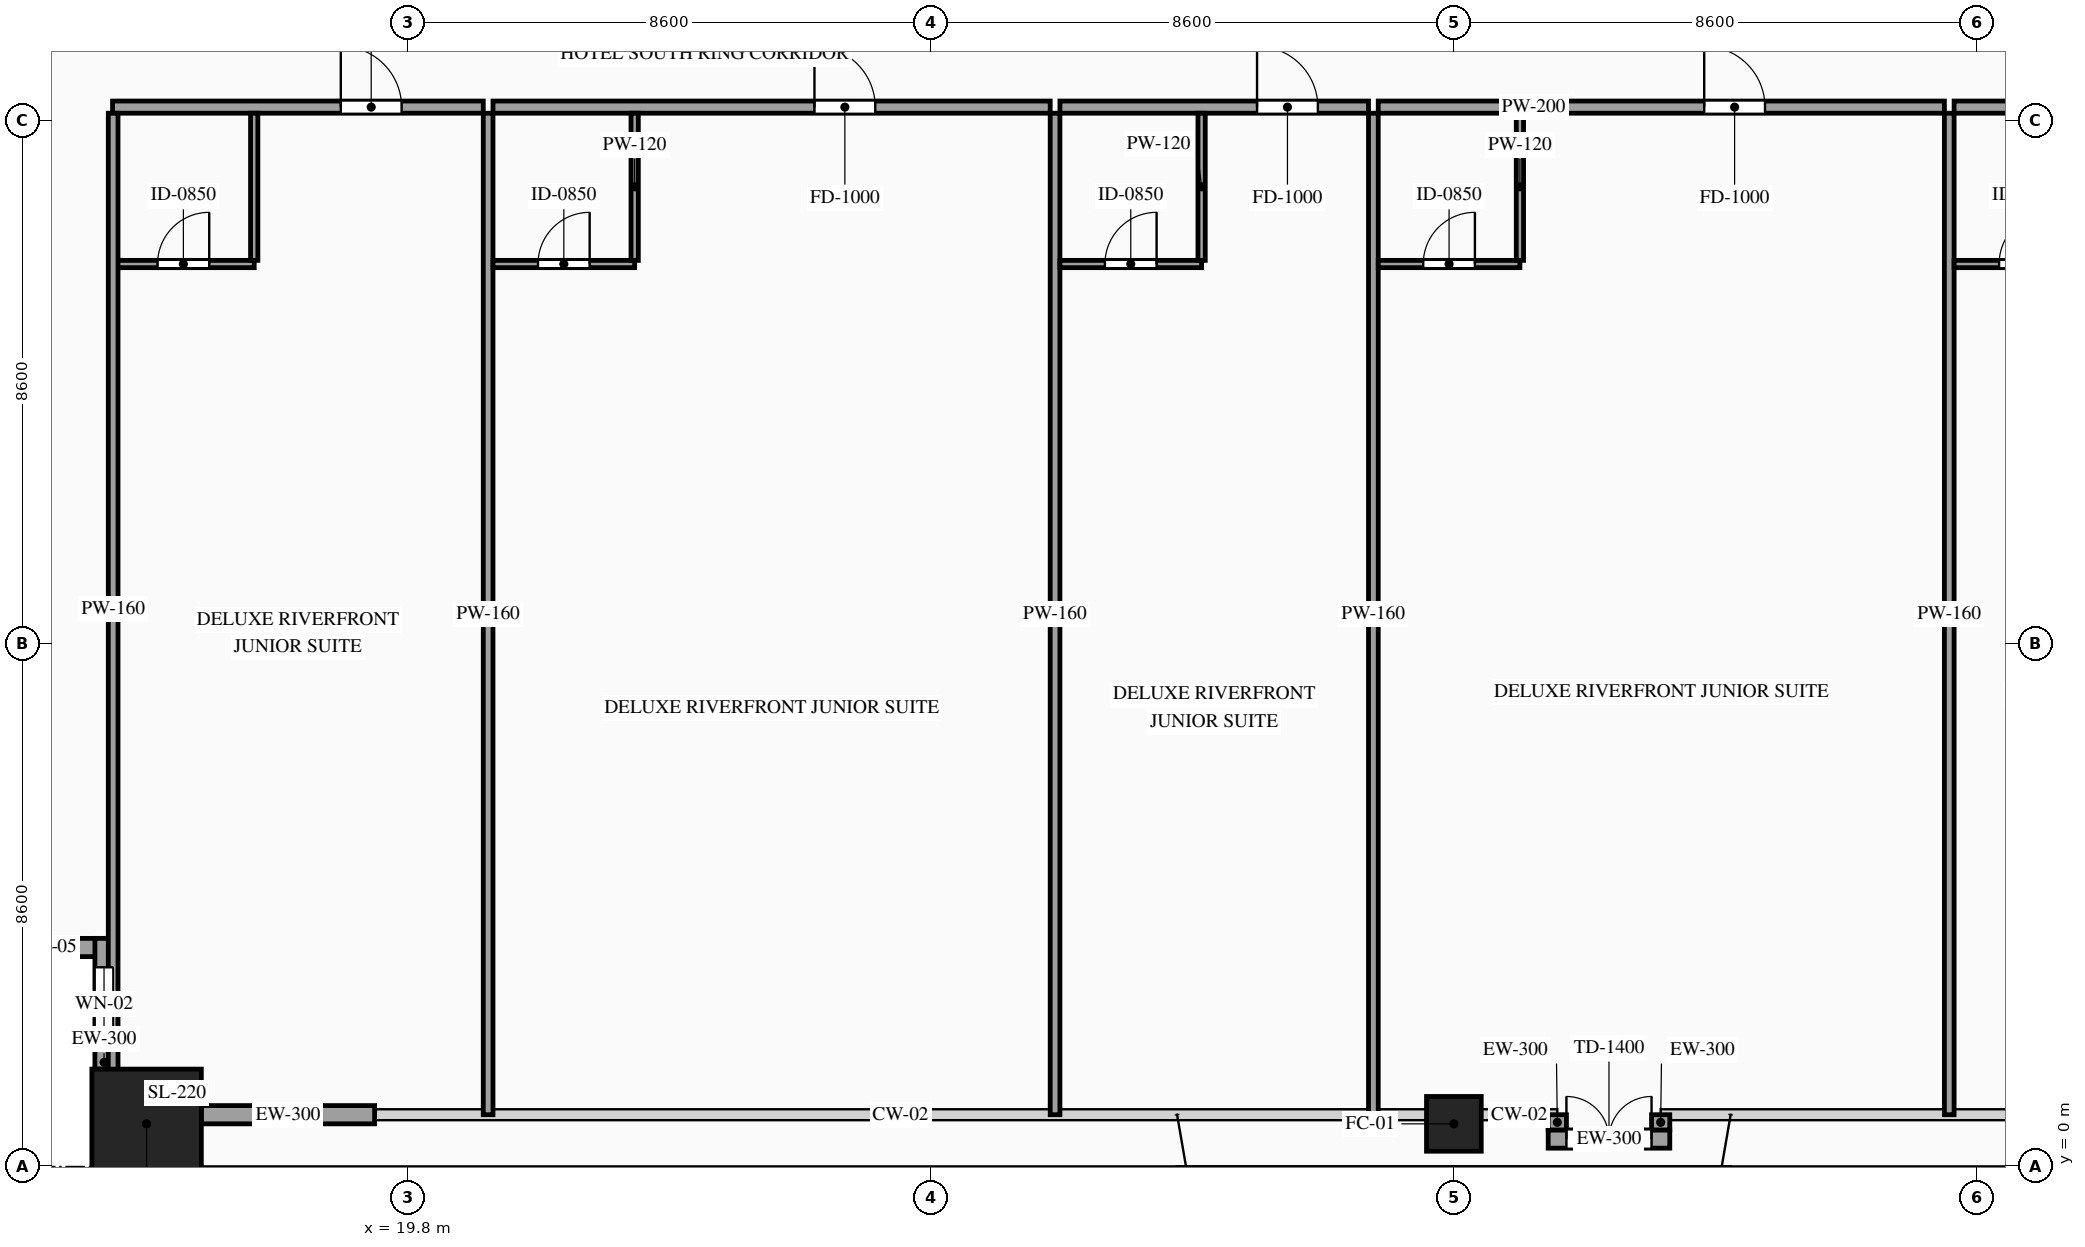
"""IFC4 building model, lengths in metres.
Left out: names, types, materials, properties, quantities, classifications, styles, units other than length and angle.
Written with IfcOpenShell. Run it as: python <this file> out.ifc"""

import sys

from ifc_helpers import new_model, si_unit, direction, frame, frame_2d, origin, origin_2d, place, context, subcontext, project, spatial, rectangle, hollow_rectangle, extrude, source, transform, mapped, element, fill, save


model = new_model("IFC4")
c1 = context("Model", 3, precision=1e-05, world=origin(), true_north=direction((0.0, 1.0)))
c2 = subcontext(c1, "Body", "Model", "MODEL_VIEW")
j1 = project(units=[si_unit("LENGTHUNIT", "METRE"), si_unit("PLANEANGLEUNIT", "RADIAN")], contexts=[c1])
p1 = place(None, origin())
s1 = spatial("IfcSite", under=j1, at=p1, CompositionType="ELEMENT")
p2 = place(p1, origin())
s2 = spatial("IfcBuilding", under=s1, at=p2, CompositionType="ELEMENT")
p3 = place(p2, frame((0.0, 0.0, 56.8)))
s3 = spatial("IfcBuildingStorey", under=s2, at=p3, CompositionType="ELEMENT", Elevation=56.8)
m1 = source(origin(), c2, "Body", "SweptSolid", [
    extrude(hollow_rectangle(XDim=1.8, YDim=1.8, WallThickness=0.08, at=origin_2d()), origin(), (0.0, 0.0, 1.0), 3.6),
])
p4 = place(p3, frame((15.5, 0.7, 0.0), z_axis=(0.0, 0.0, 1.0), x_axis=(1.0, 0.0, 0.0)))
e1 = element("IfcColumn", 1, at=p4, inside=s3, PredefinedType="COLUMN", context=c2, shape_type="MappedRepresentation", body=[
    mapped(m1, transform((0.0, 0.0, 0.0), scale=1.0)),
])
m2 = source(origin(), c2, "Body", "SweptSolid", [
    extrude(hollow_rectangle(XDim=0.9, YDim=0.9, WallThickness=0.042, at=origin_2d()), origin(), (0.0, 0.0, 1.0), 3.6),
])
p5 = place(p3, frame((37.0, 0.7, 0.0), z_axis=(0.0, 0.0, 1.0), x_axis=(1.0, 0.0, 0.0)))
e2 = element("IfcColumn", 2, at=p5, inside=s3, PredefinedType="COLUMN", context=c2, shape_type="MappedRepresentation", body=[
    mapped(m2, transform((0.0, 0.0, 0.0), scale=1.0)),
])
p6 = place(p3, frame((12.8, 3.6, 0.0), z_axis=(0.0, 0.0, 1.0), x_axis=(1.0, 0.0, 0.0)))
e3 = element("IfcWall", 3, at=p6, inside=s3, PredefinedType="SOLIDWALL", context=c2, shape_type="SweptSolid", body=[
    extrude(rectangle(XDim=2.15, YDim=0.3, at=frame_2d((1.075, 0.0))), origin(), (0.0, 0.0, 1.0), 3.38),
])
p7 = place(p6, frame((0.625, 0.0, 0.85)))
e4 = element("IfcOpeningElement", 4, at=p7, cuts=e3, PredefinedType="OPENING", context=c2, shape_type="SweptSolid", body=[
    extrude(rectangle(XDim=0.9, YDim=1.5, at=frame_2d((0.45, 0.75))), frame((0.0, 0.165, 0.0), z_axis=(0.0, -1.0, 0.0), x_axis=(1.0, 0.0, 0.0)), (0.0, 0.0, 1.0), 0.33),
])
p8 = place(p3, frame((14.8, 3.75, 0.0), z_axis=(0.0, 0.0, 1.0), x_axis=(0.0, -1.0, 0.0)))
e5 = element("IfcWall", 5, at=p8, inside=s3, PredefinedType="SOLIDWALL", context=c2, shape_type="SweptSolid", body=[
    extrude(rectangle(XDim=2.15, YDim=0.3, at=frame_2d((1.075, 0.0))), origin(), (0.0, 0.0, 1.0), 3.38),
])
p9 = place(p8, frame((0.475, 0.0, 0.85)))
e6 = element("IfcOpeningElement", 6, at=p9, cuts=e5, PredefinedType="OPENING", context=c2, shape_type="SweptSolid", body=[
    extrude(rectangle(XDim=1.2, YDim=2.1, at=frame_2d((0.6, 1.05))), frame((0.0, 0.165, 0.0), z_axis=(0.0, -1.0, 0.0), x_axis=(1.0, 0.0, 0.0)), (0.0, 0.0, 1.0), 0.33),
])
m3 = source(origin(), c2, "Body", "SweptSolid", [
    extrude(rectangle(XDim=2.85, YDim=0.3, at=frame_2d((1.425, 0.0))), origin(), (0.0, 0.0, 1.0), 2.775),
])
p10 = place(p3, frame((16.4, 0.85, 0.0), z_axis=(0.0, 0.0, 1.0), x_axis=(1.0, 0.0, 0.0)))
e7 = element("IfcWall", 7, at=p10, inside=s3, PredefinedType="SOLIDWALL", context=c2, shape_type="MappedRepresentation", body=[
    mapped(m3, transform((0.0, 0.0, 0.0), scale=1.0)),
])
p11 = place(p3, frame((38.551, 0.45, 0.0), z_axis=(0.0, 0.0, 1.0), x_axis=(1.0, 0.0, 0.0)))
e8 = element("IfcWall", 8, at=p11, inside=s3, PredefinedType="SOLIDWALL", context=c2, shape_type="SweptSolid", body=[
    extrude(rectangle(XDim=2.0, YDim=0.3, at=frame_2d((1.0, 0.0))), origin(), (0.0, 0.0, 1.0), 3.38),
])
p12 = place(p11, frame((0.3, 0.0, 0.0)))
e9 = element("IfcOpeningElement", 9, at=p12, cuts=e8, PredefinedType="OPENING", context=c2, shape_type="SweptSolid", body=[
    extrude(rectangle(XDim=1.4, YDim=2.3, at=frame_2d((0.7, 1.15))), frame((0.0, 0.165, 0.0), z_axis=(0.0, -1.0, 0.0), x_axis=(1.0, 0.0, 0.0)), (0.0, 0.0, 1.0), 0.33),
])
m4 = source(origin(), c2, "Body", "SweptSolid", [
    extrude(rectangle(XDim=0.25, YDim=0.3, at=frame_2d((0.125, 0.0))), origin(), (0.0, 0.0, 1.0), 3.38),
])
for number, where, z_axis, x_axis in (
    (10, (38.701, 0.85, 0.0), (0.0, 0.0, 1.0), (0.0, -1.0, 0.0)),
    (11, (40.401, 0.6, 0.0), (0.0, 0.0, 1.0), (0.0, 1.0, 0.0)),
):
    element("IfcWall", number, at=place(p3, frame(where, z_axis=z_axis, x_axis=x_axis)), inside=s3, PredefinedType="SOLIDWALL", context=c2, shape_type="MappedRepresentation", body=[
        mapped(m4, transform((0.0, 0.0, 0.0), scale=1.0)),
    ])
p13 = place(p3, frame((14.94, 17.42, 0.0), z_axis=(0.0, 0.0, 1.0), x_axis=(1.0, 0.0, 0.0)))
e12 = element("IfcWall", 12, at=p13, inside=s3, PredefinedType="PARTITIONING", context=c2, shape_type="SweptSolid", body=[
    extrude(rectangle(XDim=6.097, YDim=0.2, at=frame_2d((3.049, 0.0))), origin(), (0.0, 0.0, 1.0), 3.38),
])
p14 = place(p13, frame((3.754, 0.0, 0.0)))
e13 = element("IfcOpeningElement", 13, at=p14, cuts=e12, PredefinedType="OPENING", context=c2, shape_type="SweptSolid", body=[
    extrude(rectangle(XDim=1.0, YDim=2.2, at=frame_2d((0.5, 1.1))), frame((0.0, 0.115, 0.0), z_axis=(0.0, -1.0, 0.0), x_axis=(1.0, 0.0, 0.0)), (0.0, 0.0, 1.0), 0.23),
])
m5 = source(origin(), c2, "Body", "SweptSolid", [
    extrude(rectangle(XDim=16.47, YDim=0.16, at=frame_2d((8.235, 0.0))), origin(), (0.0, 0.0, 1.0), 3.38),
])
p15 = place(p3, frame((21.117, 0.85, 0.0), z_axis=(0.0, 0.0, 1.0), x_axis=(0.0, 1.0, 0.0)))
e14 = element("IfcWall", 14, at=p15, inside=s3, PredefinedType="PARTITIONING", context=c2, shape_type="MappedRepresentation", body=[
    mapped(m5, transform((0.0, 0.0, 0.0), scale=1.0)),
])
p16 = place(p3, frame((14.94, 14.84, 0.0), z_axis=(0.0, 0.0, 1.0), x_axis=(1.0, 0.0, 0.0)))
e15 = element("IfcWall", 15, at=p16, inside=s3, PredefinedType="PARTITIONING", context=c2, shape_type="SweptSolid", body=[
    extrude(rectangle(XDim=2.33, YDim=0.12, at=frame_2d((1.165, 0.0))), origin(), (0.0, 0.0, 1.0), 3.38),
])
p17 = place(p16, frame((0.74, 0.0, 0.0)))
e16 = element("IfcOpeningElement", 16, at=p17, cuts=e15, PredefinedType="OPENING", context=c2, shape_type="SweptSolid", body=[
    extrude(rectangle(XDim=0.85, YDim=2.1, at=frame_2d((0.425, 1.05))), frame((0.0, 0.075, 0.0), z_axis=(0.0, -1.0, 0.0), x_axis=(1.0, 0.0, 0.0)), (0.0, 0.0, 1.0), 0.15),
])
m6 = source(origin(), c2, "Body", "SweptSolid", [
    extrude(rectangle(XDim=2.42, YDim=0.12, at=frame_2d((1.21, 0.0))), origin(), (0.0, 0.0, 1.0), 3.38),
])
p18 = place(p3, frame((17.27, 14.9, 0.0), z_axis=(0.0, 0.0, 1.0), x_axis=(0.0, 1.0, 0.0)))
e17 = element("IfcWall", 17, at=p18, inside=s3, PredefinedType="PARTITIONING", context=c2, shape_type="MappedRepresentation", body=[
    mapped(m6, transform((0.0, 0.0, 0.0), scale=1.0)),
])
p19 = place(p3, frame((21.197, 17.42, 0.0), z_axis=(0.0, 0.0, 1.0), x_axis=(1.0, 0.0, 0.0)))
e18 = element("IfcWall", 18, at=p19, inside=s3, PredefinedType="PARTITIONING", context=c2, shape_type="SweptSolid", body=[
    extrude(rectangle(XDim=9.164, YDim=0.2, at=frame_2d((4.582, 0.0))), origin(), (0.0, 0.0, 1.0), 3.38),
])
p20 = place(p19, frame((5.287, 0.0, 0.0)))
e19 = element("IfcOpeningElement", 19, at=p20, cuts=e18, PredefinedType="OPENING", context=c2, shape_type="SweptSolid", body=[
    extrude(rectangle(XDim=1.0, YDim=2.2, at=frame_2d((0.5, 1.1))), frame((0.0, 0.115, 0.0), z_axis=(0.0, -1.0, 0.0), x_axis=(1.0, 0.0, 0.0)), (0.0, 0.0, 1.0), 0.23),
])
p21 = place(p3, frame((30.441, 0.85, 0.0), z_axis=(0.0, 0.0, 1.0), x_axis=(0.0, 1.0, 0.0)))
e20 = element("IfcWall", 20, at=p21, inside=s3, PredefinedType="PARTITIONING", context=c2, shape_type="MappedRepresentation", body=[
    mapped(m5, transform((0.0, 0.0, 0.0), scale=1.0)),
])
p22 = place(p3, frame((21.197, 14.84, 0.0), z_axis=(0.0, 0.0, 1.0), x_axis=(1.0, 0.0, 0.0)))
e21 = element("IfcWall", 21, at=p22, inside=s3, PredefinedType="PARTITIONING", context=c2, shape_type="SweptSolid", body=[
    extrude(rectangle(XDim=2.33, YDim=0.12, at=frame_2d((1.165, 0.0))), origin(), (0.0, 0.0, 1.0), 3.38),
])
p23 = place(p22, frame((0.74, 0.0, 0.0)))
e22 = element("IfcOpeningElement", 22, at=p23, cuts=e21, PredefinedType="OPENING", context=c2, shape_type="SweptSolid", body=[
    extrude(rectangle(XDim=0.85, YDim=2.1, at=frame_2d((0.425, 1.05))), frame((0.0, 0.075, 0.0), z_axis=(0.0, -1.0, 0.0), x_axis=(1.0, 0.0, 0.0)), (0.0, 0.0, 1.0), 0.15),
])
p24 = place(p3, frame((23.527, 14.9, 0.0), z_axis=(0.0, 0.0, 1.0), x_axis=(0.0, 1.0, 0.0)))
e23 = element("IfcWall", 23, at=p24, inside=s3, PredefinedType="PARTITIONING", context=c2, shape_type="MappedRepresentation", body=[
    mapped(m6, transform((0.0, 0.0, 0.0), scale=1.0)),
])
p25 = place(p3, frame((30.521, 17.42, 0.0), z_axis=(0.0, 0.0, 1.0), x_axis=(1.0, 0.0, 0.0)))
e24 = element("IfcWall", 24, at=p25, inside=s3, PredefinedType="PARTITIONING", context=c2, shape_type="SweptSolid", body=[
    extrude(rectangle(XDim=5.075, YDim=0.2, at=frame_2d((2.538, 0.0))), origin(), (0.0, 0.0, 1.0), 3.38),
])
p26 = place(p25, frame((3.242, 0.0, 0.0)))
e25 = element("IfcOpeningElement", 25, at=p26, cuts=e24, PredefinedType="OPENING", context=c2, shape_type="SweptSolid", body=[
    extrude(rectangle(XDim=1.0, YDim=2.2, at=frame_2d((0.5, 1.1))), frame((0.0, 0.115, 0.0), z_axis=(0.0, -1.0, 0.0), x_axis=(1.0, 0.0, 0.0)), (0.0, 0.0, 1.0), 0.23),
])
p27 = place(p3, frame((35.676, 0.85, 0.0), z_axis=(0.0, 0.0, 1.0), x_axis=(0.0, 1.0, 0.0)))
e26 = element("IfcWall", 26, at=p27, inside=s3, PredefinedType="PARTITIONING", context=c2, shape_type="MappedRepresentation", body=[
    mapped(m5, transform((0.0, 0.0, 0.0), scale=1.0)),
])
p28 = place(p3, frame((30.521, 14.84, 0.0), z_axis=(0.0, 0.0, 1.0), x_axis=(1.0, 0.0, 0.0)))
e27 = element("IfcWall", 27, at=p28, inside=s3, PredefinedType="PARTITIONING", context=c2, shape_type="SweptSolid", body=[
    extrude(rectangle(XDim=2.33, YDim=0.12, at=frame_2d((1.165, 0.0))), origin(), (0.0, 0.0, 1.0), 3.38),
])
p29 = place(p28, frame((0.74, 0.0, 0.0)))
e28 = element("IfcOpeningElement", 28, at=p29, cuts=e27, PredefinedType="OPENING", context=c2, shape_type="SweptSolid", body=[
    extrude(rectangle(XDim=0.85, YDim=2.1, at=frame_2d((0.425, 1.05))), frame((0.0, 0.075, 0.0), z_axis=(0.0, -1.0, 0.0), x_axis=(1.0, 0.0, 0.0)), (0.0, 0.0, 1.0), 0.15),
])
p30 = place(p3, frame((32.851, 14.9, 0.0), z_axis=(0.0, 0.0, 1.0), x_axis=(0.0, 1.0, 0.0)))
e29 = element("IfcWall", 29, at=p30, inside=s3, PredefinedType="PARTITIONING", context=c2, shape_type="MappedRepresentation", body=[
    mapped(m6, transform((0.0, 0.0, 0.0), scale=1.0)),
])
p31 = place(p3, frame((35.756, 17.42, 0.0), z_axis=(0.0, 0.0, 1.0), x_axis=(1.0, 0.0, 0.0)))
e30 = element("IfcWall", 30, at=p31, inside=s3, PredefinedType="PARTITIONING", context=c2, shape_type="SweptSolid", body=[
    extrude(rectangle(XDim=9.311, YDim=0.2, at=frame_2d((4.655, 0.0))), origin(), (0.0, 0.0, 1.0), 3.38),
])
p32 = place(p31, frame((5.361, 0.0, 0.0)))
e31 = element("IfcOpeningElement", 31, at=p32, cuts=e30, PredefinedType="OPENING", context=c2, shape_type="SweptSolid", body=[
    extrude(rectangle(XDim=1.0, YDim=2.2, at=frame_2d((0.5, 1.1))), frame((0.0, 0.115, 0.0), z_axis=(0.0, -1.0, 0.0), x_axis=(1.0, 0.0, 0.0)), (0.0, 0.0, 1.0), 0.23),
])
p33 = place(p3, frame((45.147, 0.85, 0.0), z_axis=(0.0, 0.0, 1.0), x_axis=(0.0, 1.0, 0.0)))
e32 = element("IfcWall", 32, at=p33, inside=s3, PredefinedType="PARTITIONING", context=c2, shape_type="MappedRepresentation", body=[
    mapped(m5, transform((0.0, 0.0, 0.0), scale=1.0)),
])
p34 = place(p3, frame((35.756, 14.84, 0.0), z_axis=(0.0, 0.0, 1.0), x_axis=(1.0, 0.0, 0.0)))
e33 = element("IfcWall", 33, at=p34, inside=s3, PredefinedType="PARTITIONING", context=c2, shape_type="SweptSolid", body=[
    extrude(rectangle(XDim=2.33, YDim=0.12, at=frame_2d((1.165, 0.0))), origin(), (0.0, 0.0, 1.0), 3.38),
])
p35 = place(p34, frame((0.74, 0.0, 0.0)))
e34 = element("IfcOpeningElement", 34, at=p35, cuts=e33, PredefinedType="OPENING", context=c2, shape_type="SweptSolid", body=[
    extrude(rectangle(XDim=0.85, YDim=2.1, at=frame_2d((0.425, 1.05))), frame((0.0, 0.075, 0.0), z_axis=(0.0, -1.0, 0.0), x_axis=(1.0, 0.0, 0.0)), (0.0, 0.0, 1.0), 0.15),
])
p36 = place(p3, frame((38.086, 14.9, 0.0), z_axis=(0.0, 0.0, 1.0), x_axis=(0.0, 1.0, 0.0)))
e35 = element("IfcWall", 35, at=p36, inside=s3, PredefinedType="PARTITIONING", context=c2, shape_type="MappedRepresentation", body=[
    mapped(m6, transform((0.0, 0.0, 0.0), scale=1.0)),
])
p37 = place(p3, frame((45.227, 17.42, 0.0), z_axis=(0.0, 0.0, 1.0), x_axis=(1.0, 0.0, 0.0)))
e36 = element("IfcWall", 36, at=p37, inside=s3, PredefinedType="PARTITIONING", context=c2, shape_type="SweptSolid", body=[
    extrude(rectangle(XDim=5.076, YDim=0.2, at=frame_2d((2.538, 0.0))), origin(), (0.0, 0.0, 1.0), 3.38),
])
p38 = place(p37, frame((3.243, 0.0, 0.0)))
e37 = element("IfcOpeningElement", 37, at=p38, cuts=e36, PredefinedType="OPENING", context=c2, shape_type="SweptSolid", body=[
    extrude(rectangle(XDim=1.0, YDim=2.2, at=frame_2d((0.5, 1.1))), frame((0.0, 0.115, 0.0), z_axis=(0.0, -1.0, 0.0), x_axis=(1.0, 0.0, 0.0)), (0.0, 0.0, 1.0), 0.23),
])
p39 = place(p3, frame((45.227, 14.84, 0.0), z_axis=(0.0, 0.0, 1.0), x_axis=(1.0, 0.0, 0.0)))
e38 = element("IfcWall", 38, at=p39, inside=s3, PredefinedType="PARTITIONING", context=c2, shape_type="SweptSolid", body=[
    extrude(rectangle(XDim=2.33, YDim=0.12, at=frame_2d((1.165, 0.0))), origin(), (0.0, 0.0, 1.0), 3.38),
])
p40 = place(p39, frame((0.74, 0.0, 0.0)))
e39 = element("IfcOpeningElement", 39, at=p40, cuts=e38, PredefinedType="OPENING", context=c2, shape_type="SweptSolid", body=[
    extrude(rectangle(XDim=0.85, YDim=2.1, at=frame_2d((0.425, 1.05))), frame((0.0, 0.075, 0.0), z_axis=(0.0, -1.0, 0.0), x_axis=(1.0, 0.0, 0.0)), (0.0, 0.0, 1.0), 0.15),
])
m7 = source(origin(), c2, "Body", "SweptSolid", [
    extrude(rectangle(XDim=16.32, YDim=0.16, at=frame_2d((8.16, 0.0))), origin(), (0.0, 0.0, 1.0), 3.38),
])
p41 = place(p3, frame((14.95, 1.0, 0.0), z_axis=(0.0, 0.0, 1.0), x_axis=(0.0, 1.0, 0.0)))
e40 = element("IfcWall", 40, at=p41, inside=s3, PredefinedType="PARTITIONING", context=c2, shape_type="MappedRepresentation", body=[
    mapped(m7, transform((0.0, 0.0, 0.0), scale=1.0)),
])
m8 = source(origin(), c2, "Body", "SweptSolid", [
    extrude(rectangle(XDim=0.9, YDim=1.5, at=frame_2d((0.45, 0.75))), frame((0.0, 0.03, 0.0), z_axis=(0.0, -1.0, 0.0), x_axis=(1.0, 0.0, 0.0)), (0.0, 0.0, 1.0), 0.06),
])
p42 = place(p7, origin())
e41 = element("IfcWindow", 41, at=p42, inside=s3, PartitioningType="SINGLE_PANEL", PredefinedType="WINDOW", context=c2, shape_type="MappedRepresentation", body=[
    mapped(m8, transform((0.0, 0.0, 0.0), scale=1.0)),
])
fill(e4, e41)
m9 = source(origin(), c2, "Body", "SweptSolid", [
    extrude(rectangle(XDim=1.2, YDim=2.1, at=frame_2d((0.6, 1.05))), frame((0.0, 0.03, 0.0), z_axis=(0.0, -1.0, 0.0), x_axis=(1.0, 0.0, 0.0)), (0.0, 0.0, 1.0), 0.06),
])
p43 = place(p9, origin())
e42 = element("IfcWindow", 42, at=p43, inside=s3, PartitioningType="SINGLE_PANEL", PredefinedType="WINDOW", context=c2, shape_type="MappedRepresentation", body=[
    mapped(m9, transform((0.0, 0.0, 0.0), scale=1.0)),
])
fill(e6, e42)
m10 = source(origin(), c2, "Body", "SweptSolid", [
    extrude(rectangle(XDim=1.4, YDim=2.3, at=frame_2d((0.7, 1.15))), frame((0.0, 0.025, 0.0), z_axis=(0.0, -1.0, 0.0), x_axis=(1.0, 0.0, 0.0)), (0.0, 0.0, 1.0), 0.05),
])
p44 = place(p12, origin())
e43 = element("IfcDoor", 43, at=p44, inside=s3, OperationType="DOUBLE_DOOR_SINGLE_SWING", PredefinedType="DOOR", context=c2, shape_type="MappedRepresentation", body=[
    mapped(m10, transform((0.0, 0.0, 0.0), scale=1.0)),
])
fill(e9, e43)
m11 = source(origin(), c2, "Body", "SweptSolid", [
    extrude(rectangle(XDim=1.0, YDim=2.2, at=frame_2d((0.5, 1.1))), frame((0.0, 0.025, 0.0), z_axis=(0.0, -1.0, 0.0), x_axis=(1.0, 0.0, 0.0)), (0.0, 0.0, 1.0), 0.05),
])
p45 = place(p14, origin())
e44 = element("IfcDoor", 44, at=p45, inside=s3, OperationType="SINGLE_SWING_LEFT", PredefinedType="DOOR", context=c2, shape_type="MappedRepresentation", body=[
    mapped(m11, transform((0.0, 0.0, 0.0), scale=1.0)),
])
fill(e13, e44)
m12 = source(origin(), c2, "Body", "SweptSolid", [
    extrude(rectangle(XDim=0.85, YDim=2.1, at=frame_2d((0.425, 1.05))), frame((0.0, 0.025, 0.0), z_axis=(0.0, -1.0, 0.0), x_axis=(1.0, 0.0, 0.0)), (0.0, 0.0, 1.0), 0.05),
])
p46 = place(p17, origin())
e45 = element("IfcDoor", 45, at=p46, inside=s3, OperationType="SINGLE_SWING_RIGHT", PredefinedType="DOOR", context=c2, shape_type="MappedRepresentation", body=[
    mapped(m12, transform((0.0, 0.0, 0.0), scale=1.0)),
])
fill(e16, e45)
p47 = place(p20, origin())
e46 = element("IfcDoor", 46, at=p47, inside=s3, OperationType="SINGLE_SWING_LEFT", PredefinedType="DOOR", context=c2, shape_type="MappedRepresentation", body=[
    mapped(m11, transform((0.0, 0.0, 0.0), scale=1.0)),
])
fill(e19, e46)
p48 = place(p23, origin())
e47 = element("IfcDoor", 47, at=p48, inside=s3, OperationType="SINGLE_SWING_RIGHT", PredefinedType="DOOR", context=c2, shape_type="MappedRepresentation", body=[
    mapped(m12, transform((0.0, 0.0, 0.0), scale=1.0)),
])
fill(e22, e47)
p49 = place(p26, origin())
e48 = element("IfcDoor", 48, at=p49, inside=s3, OperationType="SINGLE_SWING_LEFT", PredefinedType="DOOR", context=c2, shape_type="MappedRepresentation", body=[
    mapped(m11, transform((0.0, 0.0, 0.0), scale=1.0)),
])
fill(e25, e48)
p50 = place(p29, origin())
e49 = element("IfcDoor", 49, at=p50, inside=s3, OperationType="SINGLE_SWING_RIGHT", PredefinedType="DOOR", context=c2, shape_type="MappedRepresentation", body=[
    mapped(m12, transform((0.0, 0.0, 0.0), scale=1.0)),
])
fill(e28, e49)
p51 = place(p32, origin())
e50 = element("IfcDoor", 50, at=p51, inside=s3, OperationType="SINGLE_SWING_LEFT", PredefinedType="DOOR", context=c2, shape_type="MappedRepresentation", body=[
    mapped(m11, transform((0.0, 0.0, 0.0), scale=1.0)),
])
fill(e31, e50)
p52 = place(p35, origin())
e51 = element("IfcDoor", 51, at=p52, inside=s3, OperationType="SINGLE_SWING_RIGHT", PredefinedType="DOOR", context=c2, shape_type="MappedRepresentation", body=[
    mapped(m12, transform((0.0, 0.0, 0.0), scale=1.0)),
])
fill(e34, e51)
p53 = place(p40, origin())
e52 = element("IfcDoor", 52, at=p53, inside=s3, OperationType="SINGLE_SWING_RIGHT", PredefinedType="DOOR", context=c2, shape_type="MappedRepresentation", body=[
    mapped(m12, transform((0.0, 0.0, 0.0), scale=1.0)),
])
fill(e39, e52)
save(model, sys.argv[1])
